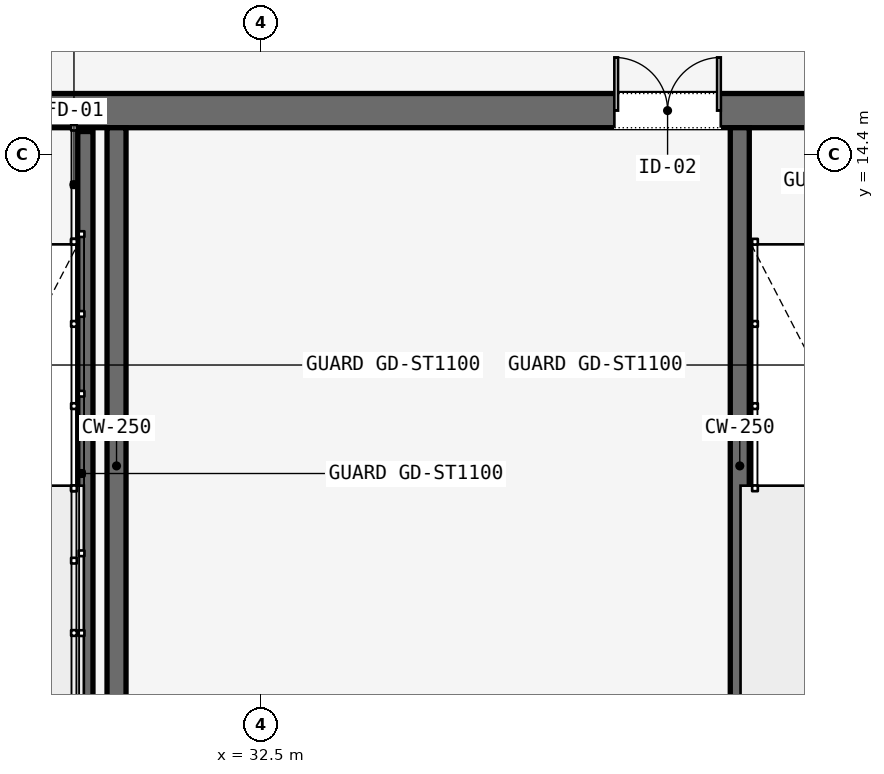
"""IFC4 building model, lengths in metres.
Left out: names, types, materials, properties, quantities, classifications, styles, units other than length and angle.
Written with IfcOpenShell. Run it as: python <this file> out.ifc"""

import sys

from ifc_helpers import new_model, si_unit, direction, frame, frame_2d, origin, place, context, subcontext, project, spatial, rectangle, extrude, element, fill, save


model = new_model("IFC4")
c1 = context("Model", 3, precision=1e-05, world=origin(), true_north=direction((0.0, 1.0)))
c2 = subcontext(c1, "Body", "Model", "MODEL_VIEW")
j1 = project(units=[si_unit("LENGTHUNIT", "METRE"), si_unit("PLANEANGLEUNIT", "RADIAN")], contexts=[c1])
p1 = place(None, origin())
s1 = spatial("IfcSite", under=j1, at=p1, CompositionType="ELEMENT")
p2 = place(p1, origin())
s2 = spatial("IfcBuilding", under=s1, at=p2, CompositionType="ELEMENT")
p3 = place(p2, frame((0.0, 0.0, -4.5)))
s3 = spatial("IfcBuildingStorey", under=s2, at=p3, CompositionType="ELEMENT", Elevation=-4.5)
p4 = place(p3, frame((26.45, 14.975, 0.0), z_axis=(0.0, 0.0, 1.0), x_axis=(1.0, 0.0, 0.0)))
e1 = element("IfcWall", 1, at=p4, inside=s3, PredefinedType="SOLIDWALL", context=c2, shape_type="SweptSolid", body=[
    extrude(rectangle(XDim=31.1, YDim=0.45, at=frame_2d((15.55, 0.0))), origin(), (0.0, 0.0, 1.0), 4.1),
])
p5 = place(p4, frame((1.65, 0.0, 0.0)))
e2 = element("IfcOpeningElement", 2, at=p5, cuts=e1, PredefinedType="OPENING", context=c2, shape_type="SweptSolid", body=[
    extrude(rectangle(XDim=1.1, YDim=2.2, at=frame_2d((0.55, 1.1))), frame((0.0, 0.225, 0.0), z_axis=(0.0, -1.0, 0.0), x_axis=(1.0, 0.0, 0.0)), (0.0, 0.0, 1.0), 0.45),
])
p6 = place(p4, frame((13.65, 0.0, 0.0)))
e3 = element("IfcOpeningElement", 3, at=p6, cuts=e1, PredefinedType="OPENING", context=c2, shape_type="SweptSolid", body=[
    extrude(rectangle(XDim=1.1, YDim=2.2, at=frame_2d((0.55, 1.1))), frame((0.0, 0.225, 0.0), z_axis=(0.0, -1.0, 0.0), x_axis=(1.0, 0.0, 0.0)), (0.0, 0.0, 1.0), 0.45),
])
p7 = place(p4, frame((25.55, 0.0, 0.0)))
e4 = element("IfcOpeningElement", 4, at=p7, cuts=e1, PredefinedType="OPENING", context=c2, shape_type="SweptSolid", body=[
    extrude(rectangle(XDim=1.1, YDim=2.2, at=frame_2d((0.55, 1.1))), frame((0.0, 0.225, 0.0), z_axis=(0.0, -1.0, 0.0), x_axis=(1.0, 0.0, 0.0)), (0.0, 0.0, 1.0), 0.45),
])
p8 = place(p4, frame((10.7, 0.0, 0.0)))
e5 = element("IfcOpeningElement", 5, at=p8, cuts=e1, PredefinedType="OPENING", context=c2, shape_type="SweptSolid", body=[
    extrude(rectangle(XDim=1.4, YDim=2.2, at=frame_2d((0.7, 1.1))), frame((0.0, 0.225, 0.0), z_axis=(0.0, -1.0, 0.0), x_axis=(1.0, 0.0, 0.0)), (0.0, 0.0, 1.0), 0.45),
])
p9 = place(p4, frame((19.35, 0.0, 0.0)))
e6 = element("IfcOpeningElement", 6, at=p9, cuts=e1, PredefinedType="OPENING", context=c2, shape_type="SweptSolid", body=[
    extrude(rectangle(XDim=1.1, YDim=2.2, at=frame_2d((0.55, 1.1))), frame((0.0, 0.225, 0.0), z_axis=(0.0, -1.0, 0.0), x_axis=(1.0, 0.0, 0.0)), (0.0, 0.0, 1.0), 0.45),
])
p10 = place(p4, frame((21.4, 0.0, 0.0)))
e7 = element("IfcOpeningElement", 7, at=p10, cuts=e1, PredefinedType="OPENING", context=c2, shape_type="SweptSolid", body=[
    extrude(rectangle(XDim=0.9, YDim=2.1, at=frame_2d((0.45, 1.05))), frame((0.0, 0.225, 0.0), z_axis=(0.0, -1.0, 0.0), x_axis=(1.0, 0.0, 0.0)), (0.0, 0.0, 1.0), 0.45),
])
p11 = place(p4, frame((23.35, 0.0, 0.0)))
e8 = element("IfcOpeningElement", 8, at=p11, cuts=e1, PredefinedType="OPENING", context=c2, shape_type="SweptSolid", body=[
    extrude(rectangle(XDim=1.3, YDim=2.3, at=frame_2d((0.65, 1.15))), frame((0.0, 0.225, 0.0), z_axis=(0.0, -1.0, 0.0), x_axis=(1.0, 0.0, 0.0)), (0.0, 0.0, 1.0), 0.45),
])
for number, where, z_axis, x_axis in (
    (9, (30.6, 5.85, 0.0), (0.0, 0.0, 1.0), (0.0, 1.0, 0.0)),
    (10, (38.8, 5.85, 0.0), (0.0, 0.0, 1.0), (0.0, 1.0, 0.0)),
):
    element("IfcWall", number, at=place(p3, frame(where, z_axis=z_axis, x_axis=x_axis)), inside=s3, PredefinedType="SOLIDWALL", context=c2, shape_type="SweptSolid", body=[
        extrude(rectangle(XDim=8.9, YDim=0.25, at=frame_2d((4.45, 0.0))), origin(), (0.0, 0.0, 1.0), 4.1),
    ])
p12 = place(p3, frame((30.19, 14.7, 0.0), z_axis=(0.0, 0.0, 1.0), x_axis=(0.0, -1.0, 0.0)))
e11 = element("IfcWall", 11, at=p12, inside=s3, PredefinedType="SOLIDWALL", context=c2, shape_type="SweptSolid", body=[
    extrude(rectangle(XDim=7.65, YDim=0.2, at=frame_2d((3.825, 0.0))), origin(), (0.0, 0.0, 1.0), 4.5),
])
p13 = place(p8, origin())
e12 = element("IfcDoor", 12, at=p13, inside=s3, OperationType="DOUBLE_DOOR_SINGLE_SWING", PredefinedType="DOOR", context=c2, shape_type="SweptSolid", body=[
    extrude(rectangle(XDim=1.4, YDim=2.2, at=frame_2d((0.7, 1.1))), frame((0.0, 0.025, 0.0), z_axis=(0.0, -1.0, 0.0), x_axis=(1.0, 0.0, 0.0)), (0.0, 0.0, 1.0), 0.05),
])
fill(e5, e12)
save(model, sys.argv[1])
